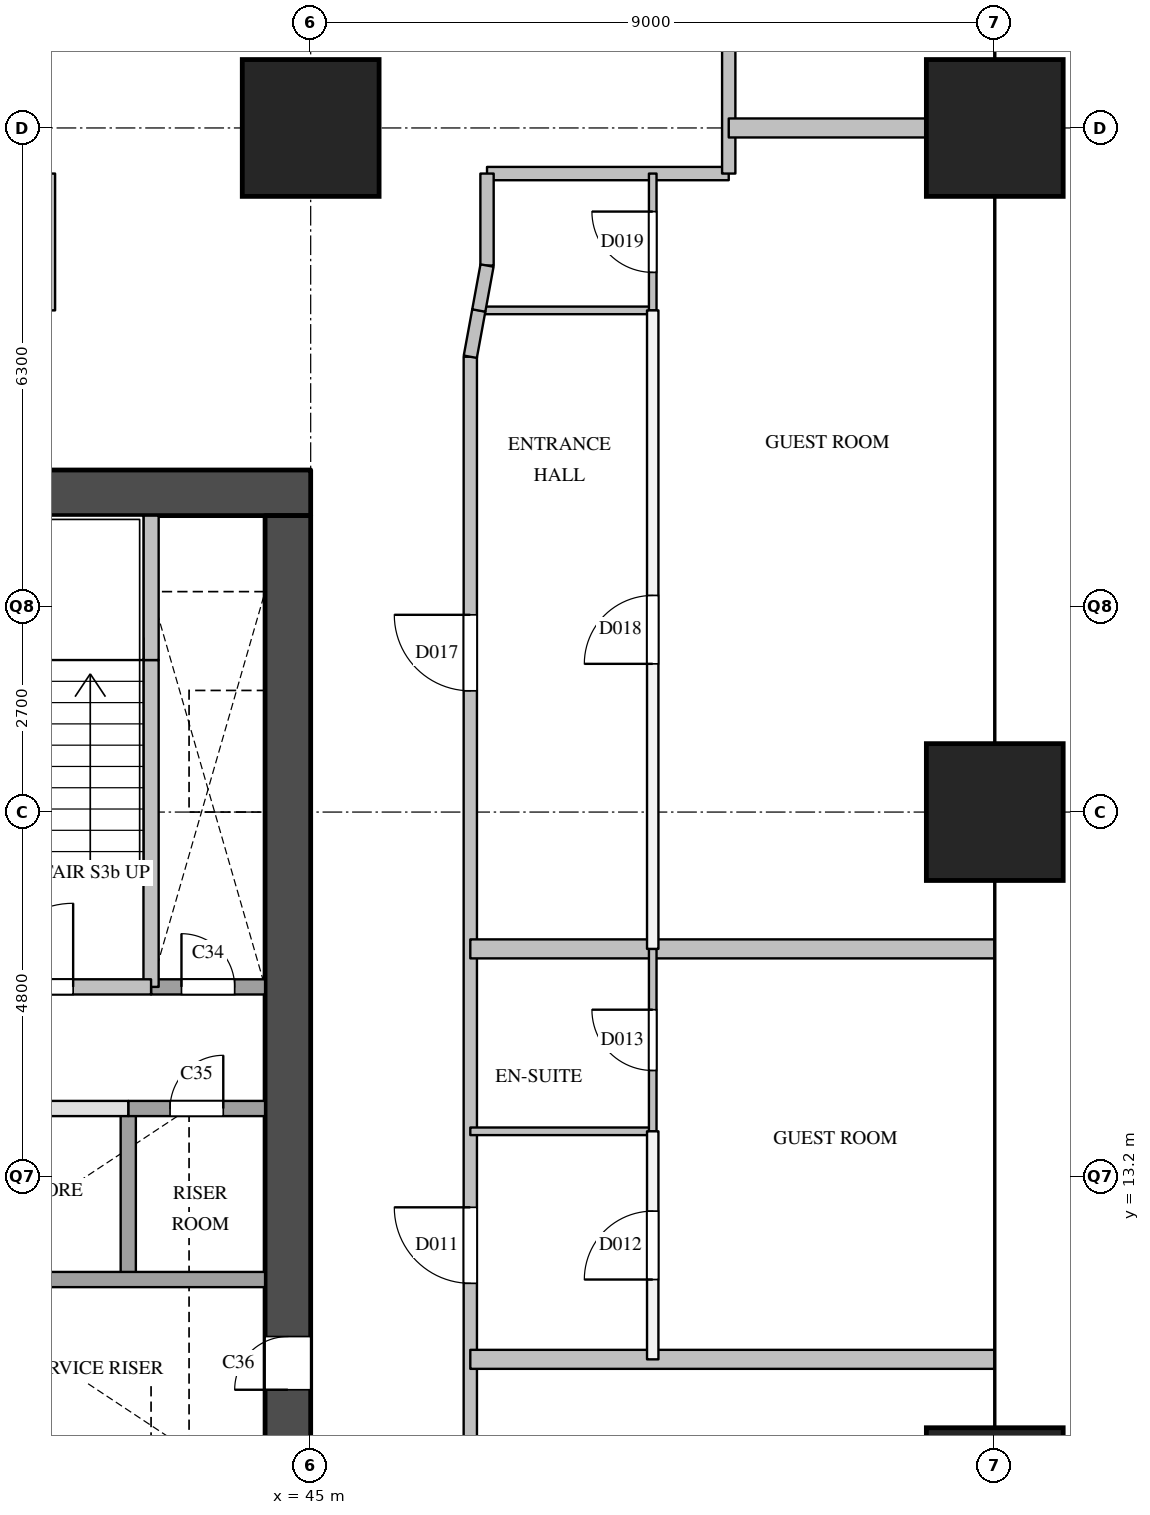
"""IFC4 building model, lengths in metres.
Left out: names, types, materials, properties, quantities, classifications, styles, units other than length and angle.
Written with IfcOpenShell. Run it as: python <this file> out.ifc"""

import sys

from ifc_helpers import new_model, si_unit, direction, frame, frame_2d, origin, origin_2d, place, context, subcontext, project, spatial, rectangle, extrude, element, fill, save


model = new_model("IFC4")
c1 = context("Model", 3, precision=1e-05, world=origin(), true_north=direction((0.0, 1.0)))
c2 = subcontext(c1, "Body", "Model", "MODEL_VIEW")
j1 = project(units=[si_unit("LENGTHUNIT", "METRE"), si_unit("PLANEANGLEUNIT", "RADIAN")], contexts=[c1])
p1 = place(None, origin())
s1 = spatial("IfcSite", under=j1, at=p1, CompositionType="ELEMENT")
p2 = place(p1, origin())
s2 = spatial("IfcBuilding", under=s1, at=p2, CompositionType="ELEMENT")
p3 = place(p2, frame((0.0, 0.0, 53.8)))
s3 = spatial("IfcBuildingStorey", under=s2, at=p3, CompositionType="ELEMENT", Elevation=53.8)
for number, where, z_axis, x_axis in (
    (1, (45.0, 27.0, 0.0), (0.0, 0.0, 1.0), (1.0, 0.0, 0.0)),
    (2, (54.0, 9.0, 0.0), (0.0, 0.0, 1.0), (1.0, 0.0, 0.0)),
    (3, (54.0, 18.0, 0.0), (0.0, 0.0, 1.0), (1.0, 0.0, 0.0)),
    (4, (54.0, 27.0, 0.0), (0.0, 0.0, 1.0), (1.0, 0.0, 0.0)),
):
    element("IfcColumn", number, at=place(p3, frame(where, z_axis=z_axis, x_axis=x_axis)), inside=s3, PredefinedType="COLUMN", context=c2, shape_type="SweptSolid", body=[
        extrude(rectangle(XDim=1.8, YDim=1.8, at=origin_2d()), origin(), (0.0, 0.0, 1.0), 3.8),
    ])
p4 = place(p3, frame((36.0, 22.2, 0.0), z_axis=(0.0, 0.0, 1.0), x_axis=(1.0, 0.0, 0.0)))
e5 = element("IfcWall", 5, at=p4, inside=s3, PredefinedType="SHEAR", context=c2, shape_type="SweptSolid", body=[
    extrude(rectangle(XDim=9.0, YDim=0.6, at=frame_2d((4.5, 0.0))), origin(), (0.0, 0.0, 1.0), 3.5),
])
p5 = place(p3, frame((44.7, 9.6, 0.0), z_axis=(0.0, 0.0, 1.0), x_axis=(0.0, 1.0, 0.0)))
e6 = element("IfcWall", 6, at=p5, inside=s3, PredefinedType="SHEAR", context=c2, shape_type="SweptSolid", body=[
    extrude(rectangle(XDim=12.3, YDim=0.6, at=frame_2d((6.15, 0.0))), origin(), (0.0, 0.0, 1.0), 3.5),
])
p6 = place(p5, frame((0.8, 0.0, 0.0)))
e7 = element("IfcOpeningElement", 7, at=p6, cuts=e6, PredefinedType="OPENING", context=c2, shape_type="SweptSolid", body=[
    extrude(rectangle(XDim=0.7, YDim=2.1, at=frame_2d((0.35, 1.05))), frame((0.0, 0.31, 0.0), z_axis=(0.0, -1.0, 0.0), x_axis=(1.0, 0.0, 0.0)), (0.0, 0.0, 1.0), 0.62),
])
p7 = place(p3, frame((42.6, 11.9, 0.0), z_axis=(0.0, 0.0, 1.0), x_axis=(0.0, 1.0, 0.0)))
e8 = element("IfcWall", 8, at=p7, inside=s3, PredefinedType="SOLIDWALL", context=c2, shape_type="SweptSolid", body=[
    extrude(rectangle(XDim=2.2, YDim=0.2, at=frame_2d((1.1, 0.0))), origin(), (0.0, 0.0, 1.0), 3.5),
])
p8 = place(p3, frame((42.9, 15.7, 0.0), z_axis=(0.0, 0.0, 1.0), x_axis=(0.0, 1.0, 0.0)))
e9 = element("IfcWall", 9, at=p8, inside=s3, PredefinedType="SOLIDWALL", context=c2, shape_type="SweptSolid", body=[
    extrude(rectangle(XDim=4.3, YDim=0.2, at=frame_2d((2.15, 0.0))), origin(), (0.0, 0.0, 1.0), 3.5),
])
p9 = place(p3, frame((42.9, 20.0, 0.0), z_axis=(0.0, 0.0, 1.0), x_axis=(0.0, 1.0, 0.0)))
e10 = element("IfcWall", 10, at=p9, inside=s3, PredefinedType="SOLIDWALL", context=c2, shape_type="SweptSolid", body=[
    extrude(rectangle(XDim=1.9, YDim=0.2, at=frame_2d((0.95, 0.0))), origin(), (0.0, 0.0, 1.0), 3.5),
])
p10 = place(p3, frame((36.6, 11.85, 0.0), z_axis=(0.0, 0.0, 1.0), x_axis=(1.0, 0.0, 0.0)))
e11 = element("IfcWall", 11, at=p10, inside=s3, PredefinedType="SOLIDWALL", context=c2, shape_type="SweptSolid", body=[
    extrude(rectangle(XDim=7.8, YDim=0.2, at=frame_2d((3.9, 0.0))), origin(), (0.0, 0.0, 1.0), 3.5),
])
p11 = place(p3, frame((36.6, 14.1, 0.0), z_axis=(0.0, 0.0, 1.0), x_axis=(1.0, 0.0, 0.0)))
e12 = element("IfcWall", 12, at=p11, inside=s3, PredefinedType="PARTITIONING", context=c2, shape_type="SweptSolid", body=[
    extrude(rectangle(XDim=6.0, YDim=0.2, at=frame_2d((3.0, 0.0))), origin(), (0.0, 0.0, 1.0), 3.5),
])
p12 = place(p11, frame((0.45, 0.0, 0.0)))
e13 = element("IfcOpeningElement", 13, at=p12, cuts=e12, PredefinedType="OPENING", context=c2, shape_type="SweptSolid", body=[
    extrude(rectangle(XDim=0.9, YDim=2.1, at=frame_2d((0.45, 1.05))), frame((0.0, 0.11, 0.0), z_axis=(0.0, -1.0, 0.0), x_axis=(1.0, 0.0, 0.0)), (0.0, 0.0, 1.0), 0.22),
])
p13 = place(p11, frame((3.45, 0.0, 0.0)))
e14 = element("IfcOpeningElement", 14, at=p13, cuts=e12, PredefinedType="OPENING", context=c2, shape_type="SweptSolid", body=[
    extrude(rectangle(XDim=0.9, YDim=2.1, at=frame_2d((0.45, 1.05))), frame((0.0, 0.11, 0.0), z_axis=(0.0, -1.0, 0.0), x_axis=(1.0, 0.0, 0.0)), (0.0, 0.0, 1.0), 0.22),
])
p14 = place(p3, frame((42.6, 14.1, 0.0), z_axis=(0.0, 0.0, 1.0), x_axis=(1.0, 0.0, 0.0)))
e15 = element("IfcWall", 15, at=p14, inside=s3, PredefinedType="SOLIDWALL", context=c2, shape_type="SweptSolid", body=[
    extrude(rectangle(XDim=1.8, YDim=0.2, at=frame_2d((0.9, 0.0))), origin(), (0.0, 0.0, 1.0), 3.5),
])
p15 = place(p14, frame((0.55, 0.0, 0.0)))
e16 = element("IfcOpeningElement", 16, at=p15, cuts=e15, PredefinedType="OPENING", context=c2, shape_type="SweptSolid", body=[
    extrude(rectangle(XDim=0.7, YDim=2.1, at=frame_2d((0.35, 1.05))), frame((0.0, 0.11, 0.0), z_axis=(0.0, -1.0, 0.0), x_axis=(1.0, 0.0, 0.0)), (0.0, 0.0, 1.0), 0.22),
])
p16 = place(p3, frame((42.9, 15.7, 0.0), z_axis=(0.0, 0.0, 1.0), x_axis=(1.0, 0.0, 0.0)))
e17 = element("IfcWall", 17, at=p16, inside=s3, PredefinedType="SOLIDWALL", context=c2, shape_type="SweptSolid", body=[
    extrude(rectangle(XDim=1.5, YDim=0.2, at=frame_2d((0.75, 0.0))), origin(), (0.0, 0.0, 1.0), 3.5),
])
p17 = place(p16, frame((0.4, 0.0, 0.0)))
e18 = element("IfcOpeningElement", 18, at=p17, cuts=e17, PredefinedType="OPENING", context=c2, shape_type="SweptSolid", body=[
    extrude(rectangle(XDim=0.7, YDim=2.1, at=frame_2d((0.35, 1.05))), frame((0.0, 0.11, 0.0), z_axis=(0.0, -1.0, 0.0), x_axis=(1.0, 0.0, 0.0)), (0.0, 0.0, 1.0), 0.22),
])
p18 = place(p3, frame((36.6, 15.7, 0.0), z_axis=(0.0, 0.0, 1.0), x_axis=(1.0, 0.0, 0.0)))
e19 = element("IfcWall", 19, at=p18, inside=s3, PredefinedType="SOLIDWALL", context=c2, shape_type="SweptSolid", body=[
    extrude(rectangle(XDim=6.3, YDim=0.2, at=frame_2d((3.15, 0.0))), origin(), (0.0, 0.0, 1.0), 3.5),
])
p19 = place(p18, frame((1.025, 0.0, 0.0)))
e20 = element("IfcOpeningElement", 20, at=p19, cuts=e19, PredefinedType="OPENING", context=c2, shape_type="SweptSolid", body=[
    extrude(rectangle(XDim=1.1, YDim=2.1, at=frame_2d((0.55, 1.05))), frame((0.0, 0.11, 0.0), z_axis=(0.0, -1.0, 0.0), x_axis=(1.0, 0.0, 0.0)), (0.0, 0.0, 1.0), 0.22),
])
p20 = place(p18, frame((4.175, 0.0, 0.0)))
e21 = element("IfcOpeningElement", 21, at=p20, cuts=e19, PredefinedType="OPENING", context=c2, shape_type="SweptSolid", body=[
    extrude(rectangle(XDim=1.1, YDim=2.1, at=frame_2d((0.55, 1.05))), frame((0.0, 0.11, 0.0), z_axis=(0.0, -1.0, 0.0), x_axis=(1.0, 0.0, 0.0)), (0.0, 0.0, 1.0), 0.22),
])
p21 = place(p3, frame((47.32, 26.4, 0.0), z_axis=(0.0, 0.0, 1.0), x_axis=(1.0, 0.0, 0.0)))
e22 = element("IfcWall", 22, at=p21, inside=s3, PredefinedType="PARTITIONING", context=c2, shape_type="SweptSolid", body=[
    extrude(rectangle(XDim=3.18, YDim=0.175, at=frame_2d((1.59, 0.0))), origin(), (0.0, 0.0, 1.0), 3.5),
])
p22 = place(p3, frame((41.55, 24.6, 0.0), z_axis=(0.0, 0.0, 1.0), x_axis=(0.0, 1.0, 0.0)))
e23 = element("IfcWall", 23, at=p22, inside=s3, PredefinedType="PARTITIONING", context=c2, shape_type="SweptSolid", body=[
    extrude(rectangle(XDim=1.8, YDim=0.175, at=frame_2d((0.9, 0.0))), origin(), (0.0, 0.0, 1.0), 3.5),
])
p23 = place(p3, frame((47.1, 6.9, 0.0), z_axis=(0.0, 0.0, 1.0), x_axis=(0.0, 1.0, 0.0)))
e24 = element("IfcWall", 24, at=p23, inside=s3, PredefinedType="PARTITIONING", context=c2, shape_type="SweptSolid", body=[
    extrude(rectangle(XDim=17.09, YDim=0.175, at=frame_2d((8.545, 0.0))), origin(), (0.0, 0.0, 1.0), 3.5),
])
p24 = place(p23, frame((1.5, 0.0, 0.0)))
e25 = element("IfcOpeningElement", 25, at=p24, cuts=e24, PredefinedType="OPENING", context=c2, shape_type="SweptSolid", body=[
    extrude(rectangle(XDim=0.9, YDim=2.1, at=frame_2d((0.45, 1.05))), frame((0.0, 0.097, 0.0), z_axis=(0.0, -1.0, 0.0), x_axis=(1.0, 0.0, 0.0)), (0.0, 0.0, 1.0), 0.195),
])
p25 = place(p23, frame((4.9, 0.0, 0.0)))
e26 = element("IfcOpeningElement", 26, at=p25, cuts=e24, PredefinedType="OPENING", context=c2, shape_type="SweptSolid", body=[
    extrude(rectangle(XDim=1.0, YDim=2.1, at=frame_2d((0.5, 1.05))), frame((0.0, 0.097, 0.0), z_axis=(0.0, -1.0, 0.0), x_axis=(1.0, 0.0, 0.0)), (0.0, 0.0, 1.0), 0.195),
])
p26 = place(p23, frame((12.695, 0.0, 0.0)))
e27 = element("IfcOpeningElement", 27, at=p26, cuts=e24, PredefinedType="OPENING", context=c2, shape_type="SweptSolid", body=[
    extrude(rectangle(XDim=1.0, YDim=2.1, at=frame_2d((0.5, 1.05))), frame((0.0, 0.097, 0.0), z_axis=(0.0, -1.0, 0.0), x_axis=(1.0, 0.0, 0.0)), (0.0, 0.0, 1.0), 0.195),
])
p27 = place(p3, frame((47.32, 25.19, 0.0), z_axis=(0.0, 0.0, 1.0), x_axis=(0.0, 1.0, 0.0)))
e28 = element("IfcWall", 28, at=p27, inside=s3, PredefinedType="PARTITIONING", context=c2, shape_type="SweptSolid", body=[
    extrude(rectangle(XDim=1.21, YDim=0.175, at=frame_2d((0.605, 0.0))), origin(), (0.0, 0.0, 1.0), 3.5),
])
p28 = place(p3, frame((50.5, 26.4, 0.0), z_axis=(0.0, 0.0, 1.0), x_axis=(0.0, 1.0, 0.0)))
e29 = element("IfcWall", 29, at=p28, inside=s3, PredefinedType="PARTITIONING", context=c2, shape_type="SweptSolid", body=[
    extrude(rectangle(XDim=25.7, YDim=0.175, at=frame_2d((12.85, 0.0))), origin(), (0.0, 0.0, 1.0), 2.5),
])
p29 = place(p28, frame((2.8, 0.0, 0.0)))
e30 = element("IfcOpeningElement", 30, at=p29, cuts=e29, PredefinedType="OPENING", context=c2, shape_type="SweptSolid", body=[
    extrude(rectangle(XDim=1.0, YDim=2.1, at=frame_2d((0.5, 1.05))), frame((0.0, 0.097, 0.0), z_axis=(0.0, -1.0, 0.0), x_axis=(1.0, 0.0, 0.0)), (0.0, 0.0, 1.0), 0.195),
])
p30 = place(p28, frame((10.95, 0.0, 0.0)))
e31 = element("IfcOpeningElement", 31, at=p30, cuts=e29, PredefinedType="OPENING", context=c2, shape_type="SweptSolid", body=[
    extrude(rectangle(XDim=0.9, YDim=2.1, at=frame_2d((0.45, 1.05))), frame((0.0, 0.097, 0.0), z_axis=(0.0, -1.0, 0.0), x_axis=(1.0, 0.0, 0.0)), (0.0, 0.0, 1.0), 0.195),
])
p31 = place(p28, frame((20.8, 0.0, 0.0)))
e32 = element("IfcOpeningElement", 32, at=p31, cuts=e29, PredefinedType="OPENING", context=c2, shape_type="SweptSolid", body=[
    extrude(rectangle(XDim=0.9, YDim=2.1, at=frame_2d((0.45, 1.05))), frame((0.0, 0.097, 0.0), z_axis=(0.0, -1.0, 0.0), x_axis=(1.0, 0.0, 0.0)), (0.0, 0.0, 1.0), 0.195),
])
p32 = place(p3, frame((49.5, 10.8, 0.0), z_axis=(0.0, 0.0, 1.0), x_axis=(0.0, 1.0, 0.0)))
e33 = element("IfcWall", 33, at=p32, inside=s3, PredefinedType="PARTITIONING", context=c2, shape_type="SweptSolid", body=[
    extrude(rectangle(XDim=3.0, YDim=0.15, at=frame_2d((1.5, 0.0))), origin(), (0.0, 0.0, 1.0), 3.5),
])
p33 = place(p32, frame((1.05, 0.0, 0.0)))
e34 = element("IfcOpeningElement", 34, at=p33, cuts=e33, PredefinedType="OPENING", context=c2, shape_type="SweptSolid", body=[
    extrude(rectangle(XDim=0.9, YDim=2.1, at=frame_2d((0.45, 1.05))), frame((0.0, 0.085, 0.0), z_axis=(0.0, -1.0, 0.0), x_axis=(1.0, 0.0, 0.0)), (0.0, 0.0, 1.0), 0.17),
])
p34 = place(p3, frame((49.5, 16.2, 0.0), z_axis=(0.0, 0.0, 1.0), x_axis=(0.0, 1.0, 0.0)))
e35 = element("IfcWall", 35, at=p34, inside=s3, PredefinedType="PARTITIONING", context=c2, shape_type="SweptSolid", body=[
    extrude(rectangle(XDim=8.4, YDim=0.15, at=frame_2d((4.2, 0.0))), origin(), (0.0, 0.0, 1.0), 3.5),
])
p35 = place(p34, frame((3.75, 0.0, 0.0)))
e36 = element("IfcOpeningElement", 36, at=p35, cuts=e35, PredefinedType="OPENING", context=c2, shape_type="SweptSolid", body=[
    extrude(rectangle(XDim=0.9, YDim=2.1, at=frame_2d((0.45, 1.05))), frame((0.0, 0.085, 0.0), z_axis=(0.0, -1.0, 0.0), x_axis=(1.0, 0.0, 0.0)), (0.0, 0.0, 1.0), 0.17),
])
for number, where, z_axis, x_axis in (
    (37, (47.1, 10.8, 0.0), (0.0, 0.0, 1.0), (1.0, 0.0, 0.0)),
    (38, (47.1, 16.2, 0.0), (0.0, 0.0, 1.0), (1.0, 0.0, 0.0)),
):
    element("IfcWall", number, at=place(p3, frame(where, z_axis=z_axis, x_axis=x_axis)), inside=s3, PredefinedType="PARTITIONING", context=c2, shape_type="SweptSolid", body=[
        extrude(rectangle(XDim=6.9, YDim=0.25, at=frame_2d((3.45, 0.0))), origin(), (0.0, 0.0, 1.0), 2.5),
    ])
p36 = place(p3, frame((50.5, 27.0, 0.0), z_axis=(0.0, 0.0, 1.0), x_axis=(1.0, 0.0, 0.0)))
e39 = element("IfcWall", 39, at=p36, inside=s3, PredefinedType="PARTITIONING", context=c2, shape_type="SweptSolid", body=[
    extrude(rectangle(XDim=3.5, YDim=0.25, at=frame_2d((1.75, 0.0))), origin(), (0.0, 0.0, 1.0), 2.5),
])
p37 = place(p3, frame((47.1, 13.8, 0.0), z_axis=(0.0, 0.0, 1.0), x_axis=(1.0, 0.0, 0.0)))
e40 = element("IfcWall", 40, at=p37, inside=s3, PredefinedType="PARTITIONING", context=c2, shape_type="SweptSolid", body=[
    extrude(rectangle(XDim=2.4, YDim=0.1, at=frame_2d((1.2, 0.0))), origin(), (0.0, 0.0, 1.0), 3.5),
])
p38 = place(p3, frame((47.212, 24.6, 0.0), z_axis=(0.0, 0.0, 1.0), x_axis=(1.0, 0.0, 0.0)))
e41 = element("IfcWall", 41, at=p38, inside=s3, PredefinedType="PARTITIONING", context=c2, shape_type="SweptSolid", body=[
    extrude(rectangle(XDim=2.288, YDim=0.1, at=frame_2d((1.144, 0.0))), origin(), (0.0, 0.0, 1.0), 3.5),
])
p39 = place(p3, frame((49.5, 13.8, 0.0), z_axis=(0.0, 0.0, 1.0), x_axis=(0.0, 1.0, 0.0)))
e42 = element("IfcWall", 42, at=p39, inside=s3, PredefinedType="PARTITIONING", context=c2, shape_type="SweptSolid", body=[
    extrude(rectangle(XDim=2.4, YDim=0.1, at=frame_2d((1.2, 0.0))), origin(), (0.0, 0.0, 1.0), 3.5),
])
p40 = place(p39, frame((0.8, 0.0, 0.0)))
e43 = element("IfcOpeningElement", 43, at=p40, cuts=e42, PredefinedType="OPENING", context=c2, shape_type="SweptSolid", body=[
    extrude(rectangle(XDim=0.8, YDim=2.1, at=frame_2d((0.4, 1.05))), frame((0.0, 0.06, 0.0), z_axis=(0.0, -1.0, 0.0), x_axis=(1.0, 0.0, 0.0)), (0.0, 0.0, 1.0), 0.12),
])
p41 = place(p3, frame((49.5, 24.6, 0.0), z_axis=(0.0, 0.0, 1.0), x_axis=(0.0, 1.0, 0.0)))
e44 = element("IfcWall", 44, at=p41, inside=s3, PredefinedType="PARTITIONING", context=c2, shape_type="SweptSolid", body=[
    extrude(rectangle(XDim=1.8, YDim=0.1, at=frame_2d((0.9, 0.0))), origin(), (0.0, 0.0, 1.0), 3.5),
])
p42 = place(p41, frame((0.5, 0.0, 0.0)))
e45 = element("IfcOpeningElement", 45, at=p42, cuts=e44, PredefinedType="OPENING", context=c2, shape_type="SweptSolid", body=[
    extrude(rectangle(XDim=0.8, YDim=2.1, at=frame_2d((0.4, 1.05))), frame((0.0, 0.06, 0.0), z_axis=(0.0, -1.0, 0.0), x_axis=(1.0, 0.0, 0.0)), (0.0, 0.0, 1.0), 0.12),
])
p43 = place(p3, frame((47.212, 24.602, 0.0), z_axis=(0.0, 0.0, 1.0), x_axis=(-0.180093775654, -0.983649445672, 0.0)))
e46 = element("IfcWall", 46, at=p43, inside=s3, PredefinedType="PARTITIONING", context=c2, shape_type="SweptSolid", body=[
    extrude(rectangle(XDim=0.622, YDim=0.175, at=frame_2d((0.311, 0.0))), origin(), (0.0, 0.0, 1.0), 3.5),
])
p44 = place(p3, frame((47.32, 25.19, 0.0), z_axis=(0.0, 0.0, 1.0), x_axis=(-0.180491370225, -0.983576568079, 0.0)))
e47 = element("IfcWall", 47, at=p44, inside=s3, PredefinedType="PARTITIONING", context=c2, shape_type="SweptSolid", body=[
    extrude(rectangle(XDim=0.602, YDim=0.175, at=frame_2d((0.301, 0.0))), origin(), (0.0, 0.0, 1.0), 3.5),
])
p45 = place(p20, origin())
e48 = element("IfcDoor", 48, at=p45, inside=s3, OperationType="SINGLE_SWING_RIGHT", PredefinedType="DOOR", context=c2, shape_type="SweptSolid", body=[
    extrude(rectangle(XDim=1.1, YDim=2.1, at=frame_2d((0.55, 1.05))), frame((0.0, 0.025, 0.0), z_axis=(0.0, -1.0, 0.0), x_axis=(1.0, 0.0, 0.0)), (0.0, 0.0, 1.0), 0.05),
])
fill(e21, e48)
p46 = place(p17, origin())
e49 = element("IfcDoor", 49, at=p46, inside=s3, OperationType="SINGLE_SWING_LEFT", PredefinedType="DOOR", context=c2, shape_type="SweptSolid", body=[
    extrude(rectangle(XDim=0.7, YDim=2.1, at=frame_2d((0.35, 1.05))), frame((0.0, 0.025, 0.0), z_axis=(0.0, -1.0, 0.0), x_axis=(1.0, 0.0, 0.0)), (0.0, 0.0, 1.0), 0.05),
])
fill(e18, e49)
p47 = place(p15, origin())
e50 = element("IfcDoor", 50, at=p47, inside=s3, OperationType="SINGLE_SWING_RIGHT", PredefinedType="DOOR", context=c2, shape_type="SweptSolid", body=[
    extrude(rectangle(XDim=0.7, YDim=2.1, at=frame_2d((0.35, 1.05))), frame((0.0, 0.025, 0.0), z_axis=(0.0, -1.0, 0.0), x_axis=(1.0, 0.0, 0.0)), (0.0, 0.0, 1.0), 0.05),
])
fill(e16, e50)
p48 = place(p6, origin())
e51 = element("IfcDoor", 51, at=p48, inside=s3, OperationType="SINGLE_SWING_LEFT", PredefinedType="DOOR", context=c2, shape_type="SweptSolid", body=[
    extrude(rectangle(XDim=0.7, YDim=2.1, at=frame_2d((0.35, 1.05))), frame((0.0, 0.025, 0.0), z_axis=(0.0, -1.0, 0.0), x_axis=(1.0, 0.0, 0.0)), (0.0, 0.0, 1.0), 0.05),
])
fill(e7, e51)
p49 = place(p25, origin())
e52 = element("IfcDoor", 52, at=p49, inside=s3, OperationType="SINGLE_SWING_RIGHT", PredefinedType="DOOR", context=c2, shape_type="SweptSolid", body=[
    extrude(rectangle(XDim=1.0, YDim=2.1, at=frame_2d((0.5, 1.05))), frame((0.0, 0.025, 0.0), z_axis=(0.0, -1.0, 0.0), x_axis=(1.0, 0.0, 0.0)), (0.0, 0.0, 1.0), 0.05),
])
fill(e26, e52)
p50 = place(p33, origin())
e53 = element("IfcDoor", 53, at=p50, inside=s3, OperationType="SINGLE_SWING_LEFT", PredefinedType="DOOR", context=c2, shape_type="SweptSolid", body=[
    extrude(rectangle(XDim=0.9, YDim=2.1, at=frame_2d((0.45, 1.05))), frame((0.0, 0.025, 0.0), z_axis=(0.0, -1.0, 0.0), x_axis=(1.0, 0.0, 0.0)), (0.0, 0.0, 1.0), 0.05),
])
fill(e34, e53)
p51 = place(p40, origin())
e54 = element("IfcDoor", 54, at=p51, inside=s3, OperationType="SINGLE_SWING_RIGHT", PredefinedType="DOOR", context=c2, shape_type="SweptSolid", body=[
    extrude(rectangle(XDim=0.8, YDim=2.1, at=frame_2d((0.4, 1.05))), frame((0.0, 0.025, 0.0), z_axis=(0.0, -1.0, 0.0), x_axis=(1.0, 0.0, 0.0)), (0.0, 0.0, 1.0), 0.05),
])
fill(e43, e54)
p52 = place(p26, origin())
e55 = element("IfcDoor", 55, at=p52, inside=s3, OperationType="SINGLE_SWING_RIGHT", PredefinedType="DOOR", context=c2, shape_type="SweptSolid", body=[
    extrude(rectangle(XDim=1.0, YDim=2.1, at=frame_2d((0.5, 1.05))), frame((0.0, 0.025, 0.0), z_axis=(0.0, -1.0, 0.0), x_axis=(1.0, 0.0, 0.0)), (0.0, 0.0, 1.0), 0.05),
])
fill(e27, e55)
p53 = place(p35, origin())
e56 = element("IfcDoor", 56, at=p53, inside=s3, OperationType="SINGLE_SWING_LEFT", PredefinedType="DOOR", context=c2, shape_type="SweptSolid", body=[
    extrude(rectangle(XDim=0.9, YDim=2.1, at=frame_2d((0.45, 1.05))), frame((0.0, 0.025, 0.0), z_axis=(0.0, -1.0, 0.0), x_axis=(1.0, 0.0, 0.0)), (0.0, 0.0, 1.0), 0.05),
])
fill(e36, e56)
p54 = place(p42, origin())
e57 = element("IfcDoor", 57, at=p54, inside=s3, OperationType="SINGLE_SWING_RIGHT", PredefinedType="DOOR", context=c2, shape_type="SweptSolid", body=[
    extrude(rectangle(XDim=0.8, YDim=2.1, at=frame_2d((0.4, 1.05))), frame((0.0, 0.025, 0.0), z_axis=(0.0, -1.0, 0.0), x_axis=(1.0, 0.0, 0.0)), (0.0, 0.0, 1.0), 0.05),
])
fill(e45, e57)
save(model, sys.argv[1])
